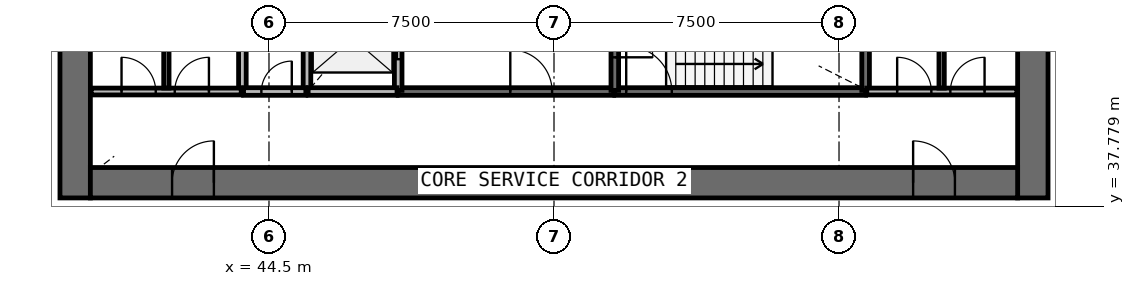
"""IFC4 building model, lengths in metres.
Left out: names, types, materials, properties, quantities, classifications, styles, units other than length and angle.
Written with IfcOpenShell. Run it as: python <this file> out.ifc"""

import sys

from ifc_helpers import new_model, si_unit, direction, frame, frame_2d, origin, place, context, subcontext, project, spatial, rectangle, extrude, source, transform, mapped, element, fill, save


model = new_model("IFC4")
c1 = context("Model", 3, precision=1e-05, world=origin(), true_north=direction((0.0, 1.0)))
c2 = subcontext(c1, "Body", "Model", "MODEL_VIEW")
j1 = project(units=[si_unit("LENGTHUNIT", "METRE"), si_unit("PLANEANGLEUNIT", "RADIAN")], contexts=[c1])
p1 = place(None, origin())
s1 = spatial("IfcSite", under=j1, at=p1, CompositionType="ELEMENT")
p2 = place(p1, origin())
s2 = spatial("IfcBuilding", under=s1, at=p2, CompositionType="ELEMENT")
p3 = place(p2, frame((0.0, 0.0, 116.7)))
s3 = spatial("IfcBuildingStorey", under=s2, at=p3, CompositionType="ELEMENT", Elevation=116.7)
p4 = place(p3, frame((64.6, 38.0, 0.0), z_axis=(0.0, 0.0, 1.0), x_axis=(0.0, 1.0, 0.0)))
e1 = element("IfcWall", 1, at=p4, inside=s3, PredefinedType="SHEAR", context=c2, shape_type="SweptSolid", body=[
    extrude(rectangle(XDim=20.0, YDim=0.8, at=frame_2d((10.0, 0.0))), origin(), (0.0, 0.0, 1.0), 4.1),
])
p5 = place(p4, frame((9.1, 0.0, 0.0)))
e2 = element("IfcOpeningElement", 2, at=p5, cuts=e1, PredefinedType="OPENING", context=c2, shape_type="SweptSolid", body=[
    extrude(rectangle(XDim=1.8, YDim=2.1, at=frame_2d((0.9, 1.05))), frame((0.0, 0.41, 0.0), z_axis=(0.0, -1.0, 0.0), x_axis=(1.0, 0.0, 0.0)), (0.0, 0.0, 1.0), 0.82),
])
p6 = place(p3, frame((39.4, 58.0, 0.0), z_axis=(0.0, 0.0, 1.0), x_axis=(0.0, -1.0, 0.0)))
e3 = element("IfcWall", 3, at=p6, inside=s3, PredefinedType="SHEAR", context=c2, shape_type="SweptSolid", body=[
    extrude(rectangle(XDim=20.0, YDim=0.8, at=frame_2d((10.0, 0.0))), origin(), (0.0, 0.0, 1.0), 4.1),
])
p7 = place(p6, frame((9.1, 0.0, 0.0)))
e4 = element("IfcOpeningElement", 4, at=p7, cuts=e3, PredefinedType="OPENING", context=c2, shape_type="SweptSolid", body=[
    extrude(rectangle(XDim=1.8, YDim=2.1, at=frame_2d((0.9, 1.05))), frame((0.0, 0.41, 0.0), z_axis=(0.0, -1.0, 0.0), x_axis=(1.0, 0.0, 0.0)), (0.0, 0.0, 1.0), 0.82),
])
p8 = place(p3, frame((39.8, 38.4, 0.0), z_axis=(0.0, 0.0, 1.0), x_axis=(1.0, 0.0, 0.0)))
e5 = element("IfcWall", 5, at=p8, inside=s3, PredefinedType="SHEAR", context=c2, shape_type="SweptSolid", body=[
    extrude(rectangle(XDim=24.4, YDim=0.8, at=frame_2d((12.2, 0.0))), origin(), (0.0, 0.0, 1.0), 4.1),
])
p9 = place(p8, frame((21.65, 0.0, 0.0)))
e6 = element("IfcOpeningElement", 6, at=p9, cuts=e5, PredefinedType="OPENING", context=c2, shape_type="SweptSolid", body=[
    extrude(rectangle(XDim=1.1, YDim=2.1, at=frame_2d((0.55, 1.05))), frame((0.0, 0.41, 0.0), z_axis=(0.0, -1.0, 0.0), x_axis=(1.0, 0.0, 0.0)), (0.0, 0.0, 1.0), 0.82),
])
p10 = place(p8, frame((2.15, 0.0, 0.0)))
e7 = element("IfcOpeningElement", 7, at=p10, cuts=e5, PredefinedType="OPENING", context=c2, shape_type="SweptSolid", body=[
    extrude(rectangle(XDim=1.1, YDim=2.1, at=frame_2d((0.55, 1.05))), frame((0.0, 0.41, 0.0), z_axis=(0.0, -1.0, 0.0), x_axis=(1.0, 0.0, 0.0)), (0.0, 0.0, 1.0), 0.82),
])
p11 = place(p3, frame((53.6, 40.8, 0.0), z_axis=(0.0, 0.0, 1.0), x_axis=(1.0, 0.0, 0.0)))
e8 = element("IfcWall", 8, at=p11, inside=s3, PredefinedType="SOLIDWALL", context=c2, shape_type="SweptSolid", body=[
    extrude(rectangle(XDim=6.6, YDim=0.2, at=frame_2d((3.3, 0.0))), origin(), (0.0, 0.0, 1.0), 3.7),
])
p12 = place(p11, frame((0.3, 0.0, 0.0)))
e9 = element("IfcOpeningElement", 9, at=p12, cuts=e8, PredefinedType="OPENING", context=c2, shape_type="SweptSolid", body=[
    extrude(rectangle(XDim=1.2, YDim=2.1, at=frame_2d((0.6, 1.05))), frame((0.0, 0.11, 0.0), z_axis=(0.0, -1.0, 0.0), x_axis=(1.0, 0.0, 0.0)), (0.0, 0.0, 1.0), 0.22),
])
p13 = place(p3, frame((47.9, 40.8, 0.0), z_axis=(0.0, 0.0, 1.0), x_axis=(1.0, 0.0, 0.0)))
e10 = element("IfcWall", 10, at=p13, inside=s3, PredefinedType="SOLIDWALL", context=c2, shape_type="SweptSolid", body=[
    extrude(rectangle(XDim=5.67, YDim=0.2, at=frame_2d((2.835, 0.0))), origin(), (0.0, 0.0, 1.0), 3.7),
])
p14 = place(p13, frame((2.95, 0.0, 0.0)))
e11 = element("IfcOpeningElement", 11, at=p14, cuts=e10, PredefinedType="OPENING", context=c2, shape_type="SweptSolid", body=[
    extrude(rectangle(XDim=1.1, YDim=2.1, at=frame_2d((0.55, 1.05))), frame((0.0, 0.11, 0.0), z_axis=(0.0, -1.0, 0.0), x_axis=(1.0, 0.0, 0.0)), (0.0, 0.0, 1.0), 0.22),
])
for number, where, z_axis, x_axis in (
    (12, (43.8, 43.6, 0.0), (0.0, 0.0, 1.0), (0.0, -1.0, 0.0)),
    (13, (45.5, 43.6, 0.0), (0.0, 0.0, 1.0), (0.0, -1.0, 0.0)),
):
    element("IfcWall", number, at=place(p3, frame(where, z_axis=z_axis, x_axis=x_axis)), inside=s3, PredefinedType="SOLIDWALL", context=c2, shape_type="SweptSolid", body=[
        extrude(rectangle(XDim=2.8, YDim=0.2, at=frame_2d((1.4, 0.0))), origin(), (0.0, 0.0, 1.0), 3.7),
    ])
p15 = place(p3, frame((47.9, 40.83, 0.0), z_axis=(0.0, 0.0, 1.0), x_axis=(0.0, 1.0, 0.0)))
e14 = element("IfcWall", 14, at=p15, inside=s3, PredefinedType="SOLIDWALL", context=c2, shape_type="SweptSolid", body=[
    extrude(rectangle(XDim=2.77, YDim=0.2, at=frame_2d((1.385, 0.0))), origin(), (0.0, 0.0, 1.0), 3.7),
])
p16 = place(p15, frame((0.82, 0.0, 0.0)))
e15 = element("IfcOpeningElement", 15, at=p16, cuts=e14, PredefinedType="OPENING", context=c2, shape_type="SweptSolid", body=[
    extrude(rectangle(XDim=1.1, YDim=2.1, at=frame_2d((0.55, 1.05))), frame((0.0, 0.11, 0.0), z_axis=(0.0, -1.0, 0.0), x_axis=(1.0, 0.0, 0.0)), (0.0, 0.0, 1.0), 0.22),
])
p17 = place(p3, frame((60.2, 40.83, 0.0), z_axis=(0.0, 0.0, 1.0), x_axis=(0.0, 1.0, 0.0)))
e16 = element("IfcWall", 16, at=p17, inside=s3, PredefinedType="SOLIDWALL", context=c2, shape_type="SweptSolid", body=[
    extrude(rectangle(XDim=2.77, YDim=0.2, at=frame_2d((1.385, 0.0))), origin(), (0.0, 0.0, 1.0), 3.7),
])
p18 = place(p3, frame((53.6, 43.6, 0.0), z_axis=(0.0, 0.0, 1.0), x_axis=(0.0, -1.0, 0.0)))
e17 = element("IfcWall", 17, at=p18, inside=s3, PredefinedType="SOLIDWALL", context=c2, shape_type="SweptSolid", body=[
    extrude(rectangle(XDim=2.77, YDim=0.2, at=frame_2d((1.385, 0.0))), origin(), (0.0, 0.0, 1.0), 3.7),
])
p19 = place(p18, frame((0.9, 0.0, 0.0)))
e18 = element("IfcOpeningElement", 18, at=p19, cuts=e17, PredefinedType="OPENING", context=c2, shape_type="SweptSolid", body=[
    extrude(rectangle(XDim=1.0, YDim=2.1, at=frame_2d((0.5, 1.05))), frame((0.0, 0.11, 0.0), z_axis=(0.0, -1.0, 0.0), x_axis=(1.0, 0.0, 0.0)), (0.0, 0.0, 1.0), 0.22),
])
p20 = place(p3, frame((45.53, 40.8, 0.0), z_axis=(0.0, 0.0, 1.0), x_axis=(1.0, 0.0, 0.0)))
e19 = element("IfcWall", 19, at=p20, inside=s3, PredefinedType="SOLIDWALL", context=c2, shape_type="SweptSolid", body=[
    extrude(rectangle(XDim=2.34, YDim=0.2, at=frame_2d((1.17, 0.0))), origin(), (0.0, 0.0, 1.0), 3.7),
])
p21 = place(p3, frame((43.83, 40.8, 0.0), z_axis=(0.0, 0.0, 1.0), x_axis=(1.0, 0.0, 0.0)))
e20 = element("IfcWall", 20, at=p21, inside=s3, PredefinedType="SOLIDWALL", context=c2, shape_type="SweptSolid", body=[
    extrude(rectangle(XDim=1.64, YDim=0.2, at=frame_2d((0.82, 0.0))), origin(), (0.0, 0.0, 1.0), 3.7),
])
p22 = place(p21, frame((0.47, 0.0, 0.0)))
e21 = element("IfcOpeningElement", 21, at=p22, cuts=e20, PredefinedType="OPENING", context=c2, shape_type="SweptSolid", body=[
    extrude(rectangle(XDim=0.8, YDim=2.1, at=frame_2d((0.4, 1.05))), frame((0.0, 0.11, 0.0), z_axis=(0.0, -1.0, 0.0), x_axis=(1.0, 0.0, 0.0)), (0.0, 0.0, 1.0), 0.22),
])
p23 = place(p3, frame((60.23, 40.8, 0.0), z_axis=(0.0, 0.0, 1.0), x_axis=(1.0, 0.0, 0.0)))
e22 = element("IfcWall", 22, at=p23, inside=s3, PredefinedType="PARTITIONING", context=c2, shape_type="SweptSolid", body=[
    extrude(rectangle(XDim=3.95, YDim=0.18, at=frame_2d((1.975, 0.0))), origin(), (0.0, 0.0, 1.0), 3.7),
])
p24 = place(p23, frame((0.8, 0.0, 0.0)))
e23 = element("IfcOpeningElement", 23, at=p24, cuts=e22, PredefinedType="OPENING", context=c2, shape_type="SweptSolid", body=[
    extrude(rectangle(XDim=0.9, YDim=2.1, at=frame_2d((0.45, 1.05))), frame((0.0, 0.1, 0.0), z_axis=(0.0, -1.0, 0.0), x_axis=(1.0, 0.0, 0.0)), (0.0, 0.0, 1.0), 0.2),
])
p25 = place(p23, frame((2.2, 0.0, 0.0)))
e24 = element("IfcOpeningElement", 24, at=p25, cuts=e22, PredefinedType="OPENING", context=c2, shape_type="SweptSolid", body=[
    extrude(rectangle(XDim=0.9, YDim=2.1, at=frame_2d((0.45, 1.05))), frame((0.0, 0.1, 0.0), z_axis=(0.0, -1.0, 0.0), x_axis=(1.0, 0.0, 0.0)), (0.0, 0.0, 1.0), 0.2),
])
p26 = place(p3, frame((39.82, 40.8, 0.0), z_axis=(0.0, 0.0, 1.0), x_axis=(1.0, 0.0, 0.0)))
e25 = element("IfcWall", 25, at=p26, inside=s3, PredefinedType="PARTITIONING", context=c2, shape_type="SweptSolid", body=[
    extrude(rectangle(XDim=3.95, YDim=0.18, at=frame_2d((1.975, 0.0))), origin(), (0.0, 0.0, 1.0), 3.7),
])
p27 = place(p26, frame((0.8, 0.0, 0.0)))
e26 = element("IfcOpeningElement", 26, at=p27, cuts=e25, PredefinedType="OPENING", context=c2, shape_type="SweptSolid", body=[
    extrude(rectangle(XDim=0.9, YDim=2.1, at=frame_2d((0.45, 1.05))), frame((0.0, 0.1, 0.0), z_axis=(0.0, -1.0, 0.0), x_axis=(1.0, 0.0, 0.0)), (0.0, 0.0, 1.0), 0.2),
])
p28 = place(p26, frame((2.2, 0.0, 0.0)))
e27 = element("IfcOpeningElement", 27, at=p28, cuts=e25, PredefinedType="OPENING", context=c2, shape_type="SweptSolid", body=[
    extrude(rectangle(XDim=0.9, YDim=2.1, at=frame_2d((0.45, 1.05))), frame((0.0, 0.1, 0.0), z_axis=(0.0, -1.0, 0.0), x_axis=(1.0, 0.0, 0.0)), (0.0, 0.0, 1.0), 0.2),
])
for number, where, z_axis, x_axis in (
    (28, (41.8, 40.89, 0.0), (0.0, 0.0, 1.0), (0.0, 1.0, 0.0)),
    (29, (62.2, 40.89, 0.0), (0.0, 0.0, 1.0), (0.0, 1.0, 0.0)),
):
    element("IfcWall", number, at=place(p3, frame(where, z_axis=z_axis, x_axis=x_axis)), inside=s3, PredefinedType="PARTITIONING", context=c2, shape_type="SweptSolid", body=[
        extrude(rectangle(XDim=2.71, YDim=0.14, at=frame_2d((1.355, 0.0))), origin(), (0.0, 0.0, 1.0), 2.9),
    ])
m1 = source(origin(), c2, "Body", "SweptSolid", [
    extrude(rectangle(XDim=1.1, YDim=2.1, at=frame_2d((0.55, 1.05))), frame((0.0, 0.025, 0.0), z_axis=(0.0, -1.0, 0.0), x_axis=(1.0, 0.0, 0.0)), (0.0, 0.0, 1.0), 0.05),
])
p29 = place(p16, origin())
e30 = element("IfcDoor", 30, at=p29, inside=s3, OperationType="DOUBLE_DOOR_SLIDING", PredefinedType="USERDEFINED", context=c2, shape_type="MappedRepresentation", body=[
    mapped(m1, transform((0.0, 0.0, 0.0), scale=1.0)),
])
fill(e15, e30)
m2 = source(origin(), c2, "Body", "SweptSolid", [
    extrude(rectangle(XDim=1.2, YDim=2.1, at=frame_2d((0.6, 1.05))), frame((0.0, 0.025, 0.0), z_axis=(0.0, -1.0, 0.0), x_axis=(1.0, 0.0, 0.0)), (0.0, 0.0, 1.0), 0.05),
])
p30 = place(p12, origin())
e31 = element("IfcDoor", 31, at=p30, inside=s3, OperationType="SINGLE_SWING_LEFT", PredefinedType="DOOR", context=c2, shape_type="MappedRepresentation", body=[
    mapped(m2, transform((0.0, 0.0, 0.0), scale=1.0)),
])
fill(e9, e31)
m3 = source(origin(), c2, "Body", "SweptSolid", [
    extrude(rectangle(XDim=1.0, YDim=2.1, at=frame_2d((0.5, 1.05))), frame((0.0, 0.025, 0.0), z_axis=(0.0, -1.0, 0.0), x_axis=(1.0, 0.0, 0.0)), (0.0, 0.0, 1.0), 0.05),
])
p31 = place(p19, origin())
e32 = element("IfcDoor", 32, at=p31, inside=s3, OperationType="SINGLE_SWING_RIGHT", PredefinedType="DOOR", context=c2, shape_type="MappedRepresentation", body=[
    mapped(m3, transform((0.0, 0.0, 0.0), scale=1.0)),
])
fill(e18, e32)
m4 = source(origin(), c2, "Body", "SweptSolid", [
    extrude(rectangle(XDim=1.1, YDim=2.1, at=frame_2d((0.55, 1.05))), frame((0.0, 0.025, 0.0), z_axis=(0.0, -1.0, 0.0), x_axis=(1.0, 0.0, 0.0)), (0.0, 0.0, 1.0), 0.05),
])
p32 = place(p14, origin())
e33 = element("IfcDoor", 33, at=p32, inside=s3, OperationType="SINGLE_SWING_LEFT", PredefinedType="DOOR", context=c2, shape_type="MappedRepresentation", body=[
    mapped(m4, transform((0.0, 0.0, 0.0), scale=1.0)),
])
fill(e11, e33)
m5 = source(origin(), c2, "Body", "SweptSolid", [
    extrude(rectangle(XDim=0.8, YDim=2.1, at=frame_2d((0.4, 1.05))), frame((0.0, 0.025, 0.0), z_axis=(0.0, -1.0, 0.0), x_axis=(1.0, 0.0, 0.0)), (0.0, 0.0, 1.0), 0.05),
])
p33 = place(p22, origin())
e34 = element("IfcDoor", 34, at=p33, inside=s3, OperationType="SINGLE_SWING_RIGHT", PredefinedType="DOOR", context=c2, shape_type="MappedRepresentation", body=[
    mapped(m5, transform((0.0, 0.0, 0.0), scale=1.0)),
])
fill(e21, e34)
m6 = source(origin(), c2, "Body", "SweptSolid", [
    extrude(rectangle(XDim=1.1, YDim=2.1, at=frame_2d((0.55, 1.05))), frame((0.0, 0.025, 0.0), z_axis=(0.0, -1.0, 0.0), x_axis=(1.0, 0.0, 0.0)), (0.0, 0.0, 1.0), 0.05),
])
p34 = place(p9, origin())
e35 = element("IfcDoor", 35, at=p34, inside=s3, OperationType="SINGLE_SWING_LEFT", PredefinedType="DOOR", context=c2, shape_type="MappedRepresentation", body=[
    mapped(m6, transform((0.0, 0.0, 0.0), scale=1.0)),
])
fill(e6, e35)
p35 = place(p10, origin())
e36 = element("IfcDoor", 36, at=p35, inside=s3, OperationType="SINGLE_SWING_RIGHT", PredefinedType="DOOR", context=c2, shape_type="MappedRepresentation", body=[
    mapped(m6, transform((0.0, 0.0, 0.0), scale=1.0)),
])
fill(e7, e36)
m7 = source(origin(), c2, "Body", "SweptSolid", [
    extrude(rectangle(XDim=0.9, YDim=2.1, at=frame_2d((0.45, 1.05))), frame((0.0, 0.025, 0.0), z_axis=(0.0, -1.0, 0.0), x_axis=(1.0, 0.0, 0.0)), (0.0, 0.0, 1.0), 0.05),
])
p36 = place(p27, origin())
e37 = element("IfcDoor", 37, at=p36, inside=s3, OperationType="SINGLE_SWING_LEFT", PredefinedType="DOOR", context=c2, shape_type="MappedRepresentation", body=[
    mapped(m7, transform((0.0, 0.0, 0.0), scale=1.0)),
])
fill(e26, e37)
p37 = place(p28, origin())
e38 = element("IfcDoor", 38, at=p37, inside=s3, OperationType="SINGLE_SWING_RIGHT", PredefinedType="DOOR", context=c2, shape_type="MappedRepresentation", body=[
    mapped(m7, transform((0.0, 0.0, 0.0), scale=1.0)),
])
fill(e27, e38)
p38 = place(p24, origin())
e39 = element("IfcDoor", 39, at=p38, inside=s3, OperationType="SINGLE_SWING_LEFT", PredefinedType="DOOR", context=c2, shape_type="MappedRepresentation", body=[
    mapped(m7, transform((0.0, 0.0, 0.0), scale=1.0)),
])
fill(e23, e39)
p39 = place(p25, origin())
e40 = element("IfcDoor", 40, at=p39, inside=s3, OperationType="SINGLE_SWING_RIGHT", PredefinedType="DOOR", context=c2, shape_type="MappedRepresentation", body=[
    mapped(m7, transform((0.0, 0.0, 0.0), scale=1.0)),
])
fill(e24, e40)
save(model, sys.argv[1])
